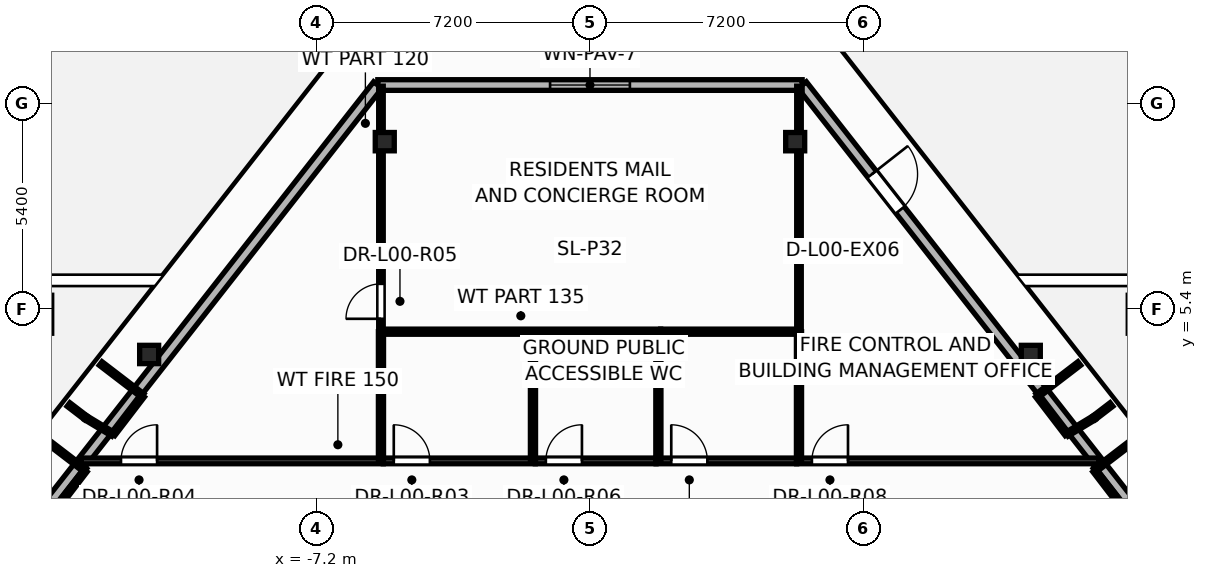
"""IFC4 building model, lengths in metres.
Left out: names, types, materials, properties, quantities, classifications, styles, units other than length and angle.
Written with IfcOpenShell. Run it as: python <this file> out.ifc"""

import sys

from ifc_helpers import new_model, si_unit, direction, frame, frame_2d, origin, origin_2d, place, context, subcontext, project, spatial, rectangle, i_section, extrude, element, fill, save


model = new_model("IFC4")
c1 = context("Model", 3, precision=1e-05, world=origin(), true_north=direction((0.0, 1.0)))
c2 = subcontext(c1, "Body", "Model", "MODEL_VIEW")
j1 = project(units=[si_unit("LENGTHUNIT", "METRE"), si_unit("PLANEANGLEUNIT", "RADIAN")], contexts=[c1])
p1 = place(None, origin())
s1 = spatial("IfcSite", under=j1, at=p1, CompositionType="ELEMENT")
p2 = place(p1, origin())
s2 = spatial("IfcBuilding", under=s1, at=p2, CompositionType="ELEMENT")
p3 = place(p2, origin())
s3 = spatial("IfcBuildingStorey", under=s2, at=p3, CompositionType="ELEMENT", Elevation=0.0)
for number, where, z_axis, x_axis in (
    (1, (-11.6, 4.2, 0.0), (0.0, 0.0, 1.0), (1.0, 0.0, 0.0)),
    (2, (11.6, 4.2, 0.0), (0.0, 0.0, 1.0), (1.0, 0.0, 0.0)),
    (3, (-5.4, 9.8, 0.0), (0.0, 0.0, 1.0), (1.0, 0.0, 0.0)),
    (4, (5.4, 9.8, 0.0), (0.0, 0.0, 1.0), (1.0, 0.0, 0.0)),
):
    element("IfcColumn", number, at=place(p3, frame(where, z_axis=z_axis, x_axis=x_axis)), inside=s3, PredefinedType="COLUMN", context=c2, shape_type="SweptSolid", body=[
        extrude(i_section(OverallWidth=0.5, OverallDepth=0.482, WebThickness=0.04, FlangeThickness=0.045, at=origin_2d()), origin(), (0.0, 0.0, 1.0), 5.4),
    ])
p4 = place(p3, frame((5.583, 11.29, -0.015), z_axis=(0.0, 0.0, 1.0), x_axis=(0.616945483616, -0.787005889588, 0.0)))
e5 = element("IfcWall", 5, at=p4, inside=s3, PredefinedType="STANDARD", context=c2, shape_type="SweptSolid", body=[
    extrude(rectangle(XDim=28.627, YDim=0.28, at=frame_2d((14.314, 0.0))), origin(), (0.0, 0.0, 1.0), 3.91),
])
p5 = place(p4, frame((2.979, 0.0, 0.015)))
e6 = element("IfcOpeningElement", 6, at=p5, cuts=e5, PredefinedType="OPENING", context=c2, shape_type="SweptSolid", body=[
    extrude(rectangle(XDim=1.206, YDim=2.154, at=frame_2d((0.6, 1.077))), frame((0.0, 0.15, 0.0), z_axis=(0.0, -1.0, 0.0), x_axis=(1.0, 0.0, 0.0)), (0.0, 0.0, 1.0), 0.3),
])
p6 = place(p3, frame((-5.583, 11.29, -0.015), z_axis=(0.0, 0.0, 1.0), x_axis=(1.0, 0.0, 0.0)))
e7 = element("IfcWall", 7, at=p6, inside=s3, PredefinedType="STANDARD", context=c2, shape_type="SweptSolid", body=[
    extrude(rectangle(XDim=11.166, YDim=0.28, at=frame_2d((5.583, 0.0))), origin(), (0.0, 0.0, 1.0), 5.135),
])
p7 = place(p6, frame((4.533, 0.0, 0.85)))
e8 = element("IfcOpeningElement", 8, at=p7, cuts=e7, PredefinedType="OPENING", context=c2, shape_type="SweptSolid", body=[
    extrude(rectangle(XDim=2.106, YDim=2.404, at=frame_2d((1.05, 1.202))), frame((0.0, 0.15, 0.0), z_axis=(0.0, -1.0, 0.0), x_axis=(1.0, 0.0, 0.0)), (0.0, 0.0, 1.0), 0.3),
])
p8 = place(p3, frame((-23.245, -11.24, -0.015), z_axis=(0.0, 0.0, 1.0), x_axis=(0.616945483616, 0.787005889588, 0.0)))
e9 = element("IfcWall", 9, at=p8, inside=s3, PredefinedType="STANDARD", context=c2, shape_type="SweptSolid", body=[
    extrude(rectangle(XDim=28.627, YDim=0.28, at=frame_2d((14.314, 0.0))), origin(), (0.0, 0.0, 1.0), 3.91),
])
p9 = place(p3, frame((-13.4, 1.4, 0.0), z_axis=(0.0, 0.0, 1.0), x_axis=(1.0, 0.0, 0.0)))
e10 = element("IfcWall", 10, at=p9, inside=s3, PredefinedType="PARTITIONING", context=c2, shape_type="SweptSolid", body=[
    extrude(rectangle(XDim=7.96, YDim=0.15, at=frame_2d((3.98, 0.0))), origin(), (0.0, 0.0, 1.0), 5.12),
])
p10 = place(p9, frame((1.059, 0.0, 0.0)))
e11 = element("IfcOpeningElement", 11, at=p10, cuts=e10, PredefinedType="OPENING", context=c2, shape_type="SweptSolid", body=[
    extrude(rectangle(XDim=0.956, YDim=2.104, at=frame_2d((0.475, 1.052))), frame((0.0, 0.085, 0.0), z_axis=(0.0, -1.0, 0.0), x_axis=(1.0, 0.0, 0.0)), (0.0, 0.0, 1.0), 0.17),
])
p11 = place(p3, frame((5.44, 1.4, 0.0), z_axis=(0.0, 0.0, 1.0), x_axis=(1.0, 0.0, 0.0)))
e12 = element("IfcWall", 12, at=p11, inside=s3, PredefinedType="PARTITIONING", context=c2, shape_type="SweptSolid", body=[
    extrude(rectangle(XDim=7.96, YDim=0.15, at=frame_2d((3.98, 0.0))), origin(), (0.0, 0.0, 1.0), 5.12),
])
p12 = place(p11, frame((0.4, 0.0, 0.0)))
e13 = element("IfcOpeningElement", 13, at=p12, cuts=e12, PredefinedType="OPENING", context=c2, shape_type="SweptSolid", body=[
    extrude(rectangle(XDim=0.956, YDim=2.104, at=frame_2d((0.475, 1.052))), frame((0.0, 0.085, 0.0), z_axis=(0.0, -1.0, 0.0), x_axis=(1.0, 0.0, 0.0)), (0.0, 0.0, 1.0), 0.17),
])
p13 = place(p3, frame((-5.5, 4.74, 0.0), z_axis=(0.0, 0.0, 1.0), x_axis=(0.0, 1.0, 0.0)))
e14 = element("IfcWall", 14, at=p13, inside=s3, PredefinedType="PARTITIONING", context=c2, shape_type="SweptSolid", body=[
    extrude(rectangle(XDim=6.52, YDim=0.12, at=frame_2d((3.26, 0.0))), origin(), (0.0, 0.0, 1.0), 4.095),
])
p14 = place(p13, frame((0.399, 0.0, 0.0)))
e15 = element("IfcOpeningElement", 15, at=p14, cuts=e14, PredefinedType="OPENING", context=c2, shape_type="SweptSolid", body=[
    extrude(rectangle(XDim=0.926, YDim=2.104, at=frame_2d((0.46, 1.052))), frame((0.0, 0.07, 0.0), z_axis=(0.0, -1.0, 0.0), x_axis=(1.0, 0.0, 0.0)), (0.0, 0.0, 1.0), 0.14),
])
p15 = place(p3, frame((5.5, 4.8, 0.0), z_axis=(0.0, 0.0, 1.0), x_axis=(0.0, 1.0, 0.0)))
e16 = element("IfcWall", 16, at=p15, inside=s3, PredefinedType="PARTITIONING", context=c2, shape_type="SweptSolid", body=[
    extrude(rectangle(XDim=6.46, YDim=0.12, at=frame_2d((3.23, 0.0))), origin(), (0.0, 0.0, 1.0), 4.095),
])
p16 = place(p3, frame((-5.438, 1.4, 0.0), z_axis=(0.0, 0.0, 1.0), x_axis=(1.0, 0.0, 0.0)))
e17 = element("IfcWall", 17, at=p16, inside=s3, PredefinedType="PARTITIONING", context=c2, shape_type="SweptSolid", body=[
    extrude(rectangle(XDim=3.998, YDim=0.15, at=frame_2d((1.999, 0.0))), origin(), (0.0, 0.0, 1.0), 5.12),
])
p17 = place(p16, frame((0.275, 0.0, 0.0)))
e18 = element("IfcOpeningElement", 18, at=p17, cuts=e17, PredefinedType="OPENING", context=c2, shape_type="SweptSolid", body=[
    extrude(rectangle(XDim=0.956, YDim=2.104, at=frame_2d((0.475, 1.052))), frame((0.0, 0.085, 0.0), z_axis=(0.0, -1.0, 0.0), x_axis=(1.0, 0.0, 0.0)), (0.0, 0.0, 1.0), 0.17),
])
p18 = place(p3, frame((-5.5, 4.8, 0.0), z_axis=(0.0, 0.0, 1.0), x_axis=(1.0, 0.0, 0.0)))
e19 = element("IfcWall", 19, at=p18, inside=s3, PredefinedType="PARTITIONING", context=c2, shape_type="SweptSolid", body=[
    extrude(rectangle(XDim=7.36, YDim=0.135, at=frame_2d((3.68, 0.0))), origin(), (0.0, 0.0, 1.0), 5.12),
])
p19 = place(p3, frame((1.74, 1.4, 0.0), z_axis=(0.0, 0.0, 1.0), x_axis=(1.0, 0.0, 0.0)))
e20 = element("IfcWall", 20, at=p19, inside=s3, PredefinedType="PARTITIONING", context=c2, shape_type="SweptSolid", body=[
    extrude(rectangle(XDim=3.698, YDim=0.15, at=frame_2d((1.849, 0.0))), origin(), (0.0, 0.0, 1.0), 5.12),
])
p20 = place(p19, frame((0.399, 0.0, 0.0)))
e21 = element("IfcOpeningElement", 21, at=p20, cuts=e20, PredefinedType="OPENING", context=c2, shape_type="SweptSolid", body=[
    extrude(rectangle(XDim=0.956, YDim=2.104, at=frame_2d((0.475, 1.052))), frame((0.0, 0.085, 0.0), z_axis=(0.0, -1.0, 0.0), x_axis=(1.0, 0.0, 0.0)), (0.0, 0.0, 1.0), 0.17),
])
p21 = place(p3, frame((1.862, 4.8, 0.0), z_axis=(0.0, 0.0, 1.0), x_axis=(1.0, 0.0, 0.0)))
e22 = element("IfcWall", 22, at=p21, inside=s3, PredefinedType="PARTITIONING", context=c2, shape_type="SweptSolid", body=[
    extrude(rectangle(XDim=3.638, YDim=0.135, at=frame_2d((1.819, 0.0))), origin(), (0.0, 0.0, 1.0), 5.12),
])
p22 = place(p3, frame((-1.438, 1.4, 0.0), z_axis=(0.0, 0.0, 1.0), x_axis=(1.0, 0.0, 0.0)))
e23 = element("IfcWall", 23, at=p22, inside=s3, PredefinedType="PARTITIONING", context=c2, shape_type="SweptSolid", body=[
    extrude(rectangle(XDim=3.176, YDim=0.15, at=frame_2d((1.588, 0.0))), origin(), (0.0, 0.0, 1.0), 5.12),
])
p23 = place(p22, frame((0.277, 0.0, 0.0)))
e24 = element("IfcOpeningElement", 24, at=p23, cuts=e23, PredefinedType="OPENING", context=c2, shape_type="SweptSolid", body=[
    extrude(rectangle(XDim=0.956, YDim=2.104, at=frame_2d((0.475, 1.052))), frame((0.0, 0.085, 0.0), z_axis=(0.0, -1.0, 0.0), x_axis=(1.0, 0.0, 0.0)), (0.0, 0.0, 1.0), 0.17),
])
for number, where, z_axis, x_axis in (
    (25, (-5.5, 1.4, 0.0), (0.0, 0.0, 1.0), (0.0, 1.0, 0.0)),
    (26, (-1.5, 1.4, 0.0), (0.0, 0.0, 1.0), (0.0, 1.0, 0.0)),
    (27, (1.8, 1.4, 0.0), (0.0, 0.0, 1.0), (0.0, 1.0, 0.0)),
    (28, (5.5, 1.4, 0.0), (0.0, 0.0, 1.0), (0.0, 1.0, 0.0)),
):
    element("IfcWall", number, at=place(p3, frame(where, z_axis=z_axis, x_axis=x_axis)), inside=s3, PredefinedType="PARTITIONING", context=c2, shape_type="SweptSolid", body=[
        extrude(rectangle(XDim=3.4, YDim=0.135, at=frame_2d((1.7, 0.0))), origin(), (0.0, 0.0, 1.0), 3.895),
    ])
for number, where, z_axis, x_axis in (
    (29, (-14.407, 2.011, 0.0), (0.0, 0.0, 1.0), (0.794, -0.608, 0.0)),
    (30, (13.281, 1.149, 0.0), (0.0, 0.0, 1.0), (0.794, 0.608, 0.0)),
):
    element("IfcWall", number, at=place(p3, frame(where, z_axis=z_axis, x_axis=x_axis)), inside=s3, PredefinedType="PARTITIONING", context=c2, shape_type="SweptSolid", body=[
        extrude(rectangle(XDim=1.418, YDim=0.12, at=frame_2d((0.709, 0.0))), origin(), (0.0, 0.0, 1.0), 4.187),
    ])
for number, where, z_axis, x_axis in (
    (31, (-12.877, 3.963, 0.0), (0.0, 0.0, 1.0), (0.794, -0.608, 0.0)),
    (32, (11.772, 3.117, 0.0), (0.0, 0.0, 1.0), (0.794, 0.608, 0.0)),
):
    element("IfcWall", number, at=place(p3, frame(where, z_axis=z_axis, x_axis=x_axis)), inside=s3, PredefinedType="PARTITIONING", context=c2, shape_type="SweptSolid", body=[
        extrude(rectangle(XDim=1.391, YDim=0.12, at=frame_2d((0.695, 0.0))), origin(), (0.0, 0.0, 1.0), 4.187),
    ])
for number, where, z_axis, x_axis in (
    (33, (-11.772, 3.117, 0.0), (0.0, 0.0, 1.0), (-0.608, -0.794, 0.0)),
    (34, (12.551, 2.101, 0.0), (0.0, 0.0, 1.0), (-0.608, 0.794, 0.0)),
    (35, (-13.281, 1.149, 0.0), (0.0, 0.0, 1.0), (-0.608, -0.794, 0.0)),
    (36, (14.059, 0.132, 0.0), (0.0, 0.0, 1.0), (-0.608, 0.794, 0.0)),
):
    element("IfcWall", number, at=place(p3, frame(where, z_axis=z_axis, x_axis=x_axis)), inside=s3, PredefinedType="PARTITIONING", context=c2, shape_type="SweptSolid", body=[
        extrude(rectangle(XDim=1.28, YDim=0.12, at=frame_2d((0.64, 0.0))), origin(), (0.0, 0.0, 1.0), 5.12),
    ])
for number, where, z_axis, x_axis in (
    (37, (-14.059, 0.132, 0.0), (0.0, 0.0, 1.0), (-0.925, 0.38, 0.0)),
    (38, (14.832, 0.449, 0.0), (0.0, 0.0, 1.0), (-0.925, -0.38, 0.0)),
):
    element("IfcWall", number, at=place(p3, frame(where, z_axis=z_axis, x_axis=x_axis)), inside=s3, PredefinedType="PARTITIONING", context=c2, shape_type="SweptSolid", body=[
        extrude(rectangle(XDim=0.835, YDim=0.12, at=frame_2d((0.418, 0.0))), origin(), (0.0, 0.0, 1.0), 5.12),
    ])
for number, where, z_axis, x_axis in (
    (39, (-12.551, 2.101, 0.0), (0.0, 0.0, 1.0), (-0.856, 0.517, 0.0)),
    (40, (13.263, 2.531, 0.0), (0.0, 0.0, 1.0), (-0.856, -0.517, 0.0)),
):
    element("IfcWall", number, at=place(p3, frame(where, z_axis=z_axis, x_axis=x_axis)), inside=s3, PredefinedType="PARTITIONING", context=c2, shape_type="SweptSolid", body=[
        extrude(rectangle(XDim=0.832, YDim=0.12, at=frame_2d((0.416, 0.0))), origin(), (0.0, 0.0, 1.0), 5.12),
    ])
for number, where, z_axis, x_axis in (
    (41, (-13.263, 2.531, 0.0), (0.0, 0.0, 1.0), (-0.794, 0.608, 0.0)),
    (42, (13.723, 2.884, 0.0), (0.0, 0.0, 1.0), (-0.794, -0.608, 0.0)),
):
    element("IfcWall", number, at=place(p3, frame(where, z_axis=z_axis, x_axis=x_axis)), inside=s3, PredefinedType="PARTITIONING", context=c2, shape_type="SweptSolid", body=[
        extrude(rectangle(XDim=0.579, YDim=0.12, at=frame_2d((0.29, 0.0))), origin(), (0.0, 0.0, 1.0), 4.187),
    ])
p24 = place(p5, origin())
e43 = element("IfcDoor", 43, at=p24, inside=s3, OperationType="SINGLE_SWING_LEFT", PredefinedType="DOOR", context=c2, shape_type="SweptSolid", body=[
    extrude(rectangle(XDim=1.2, YDim=2.15, at=frame_2d((0.6, 1.075))), frame((0.0, 0.025, 0.0), z_axis=(0.0, -1.0, 0.0), x_axis=(1.0, 0.0, 0.0)), (0.0, 0.0, 1.0), 0.05),
])
fill(e6, e43)
p25 = place(p7, origin())
e44 = element("IfcWindow", 44, at=p25, inside=s3, PartitioningType="SINGLE_PANEL", PredefinedType="WINDOW", context=c2, shape_type="SweptSolid", body=[
    extrude(rectangle(XDim=2.1, YDim=2.4, at=frame_2d((1.05, 1.2))), frame((0.0, 0.03, 0.0), z_axis=(0.0, -1.0, 0.0), x_axis=(1.0, 0.0, 0.0)), (0.0, 0.0, 1.0), 0.06),
])
fill(e8, e44)
p26 = place(p17, origin())
e45 = element("IfcDoor", 45, at=p26, inside=s3, OperationType="SINGLE_SWING_LEFT", PredefinedType="DOOR", context=c2, shape_type="SweptSolid", body=[
    extrude(rectangle(XDim=0.95, YDim=2.1, at=frame_2d((0.475, 1.05))), frame((0.0, 0.025, 0.0), z_axis=(0.0, -1.0, 0.0), x_axis=(1.0, 0.0, 0.0)), (0.0, 0.0, 1.0), 0.05),
])
fill(e18, e45)
p27 = place(p10, origin())
e46 = element("IfcDoor", 46, at=p27, inside=s3, OperationType="SINGLE_SWING_RIGHT", PredefinedType="DOOR", context=c2, shape_type="SweptSolid", body=[
    extrude(rectangle(XDim=0.95, YDim=2.1, at=frame_2d((0.475, 1.05))), frame((0.0, 0.025, 0.0), z_axis=(0.0, -1.0, 0.0), x_axis=(1.0, 0.0, 0.0)), (0.0, 0.0, 1.0), 0.05),
])
fill(e11, e46)
p28 = place(p14, origin())
e47 = element("IfcDoor", 47, at=p28, inside=s3, OperationType="SINGLE_SWING_LEFT", PredefinedType="DOOR", context=c2, shape_type="SweptSolid", body=[
    extrude(rectangle(XDim=0.92, YDim=2.1, at=frame_2d((0.46, 1.05))), frame((0.0, 0.025, 0.0), z_axis=(0.0, -1.0, 0.0), x_axis=(1.0, 0.0, 0.0)), (0.0, 0.0, 1.0), 0.05),
])
fill(e15, e47)
p29 = place(p23, origin())
e48 = element("IfcDoor", 48, at=p29, inside=s3, OperationType="SINGLE_SWING_RIGHT", PredefinedType="DOOR", context=c2, shape_type="SweptSolid", body=[
    extrude(rectangle(XDim=0.95, YDim=2.1, at=frame_2d((0.475, 1.05))), frame((0.0, 0.025, 0.0), z_axis=(0.0, -1.0, 0.0), x_axis=(1.0, 0.0, 0.0)), (0.0, 0.0, 1.0), 0.05),
])
fill(e24, e48)
p30 = place(p20, origin())
e49 = element("IfcDoor", 49, at=p30, inside=s3, OperationType="SINGLE_SWING_LEFT", PredefinedType="DOOR", context=c2, shape_type="SweptSolid", body=[
    extrude(rectangle(XDim=0.95, YDim=2.1, at=frame_2d((0.475, 1.05))), frame((0.0, 0.025, 0.0), z_axis=(0.0, -1.0, 0.0), x_axis=(1.0, 0.0, 0.0)), (0.0, 0.0, 1.0), 0.05),
])
fill(e21, e49)
p31 = place(p12, origin())
e50 = element("IfcDoor", 50, at=p31, inside=s3, OperationType="SINGLE_SWING_RIGHT", PredefinedType="DOOR", context=c2, shape_type="SweptSolid", body=[
    extrude(rectangle(XDim=0.95, YDim=2.1, at=frame_2d((0.475, 1.05))), frame((0.0, 0.025, 0.0), z_axis=(0.0, -1.0, 0.0), x_axis=(1.0, 0.0, 0.0)), (0.0, 0.0, 1.0), 0.05),
])
fill(e13, e50)
save(model, sys.argv[1])
